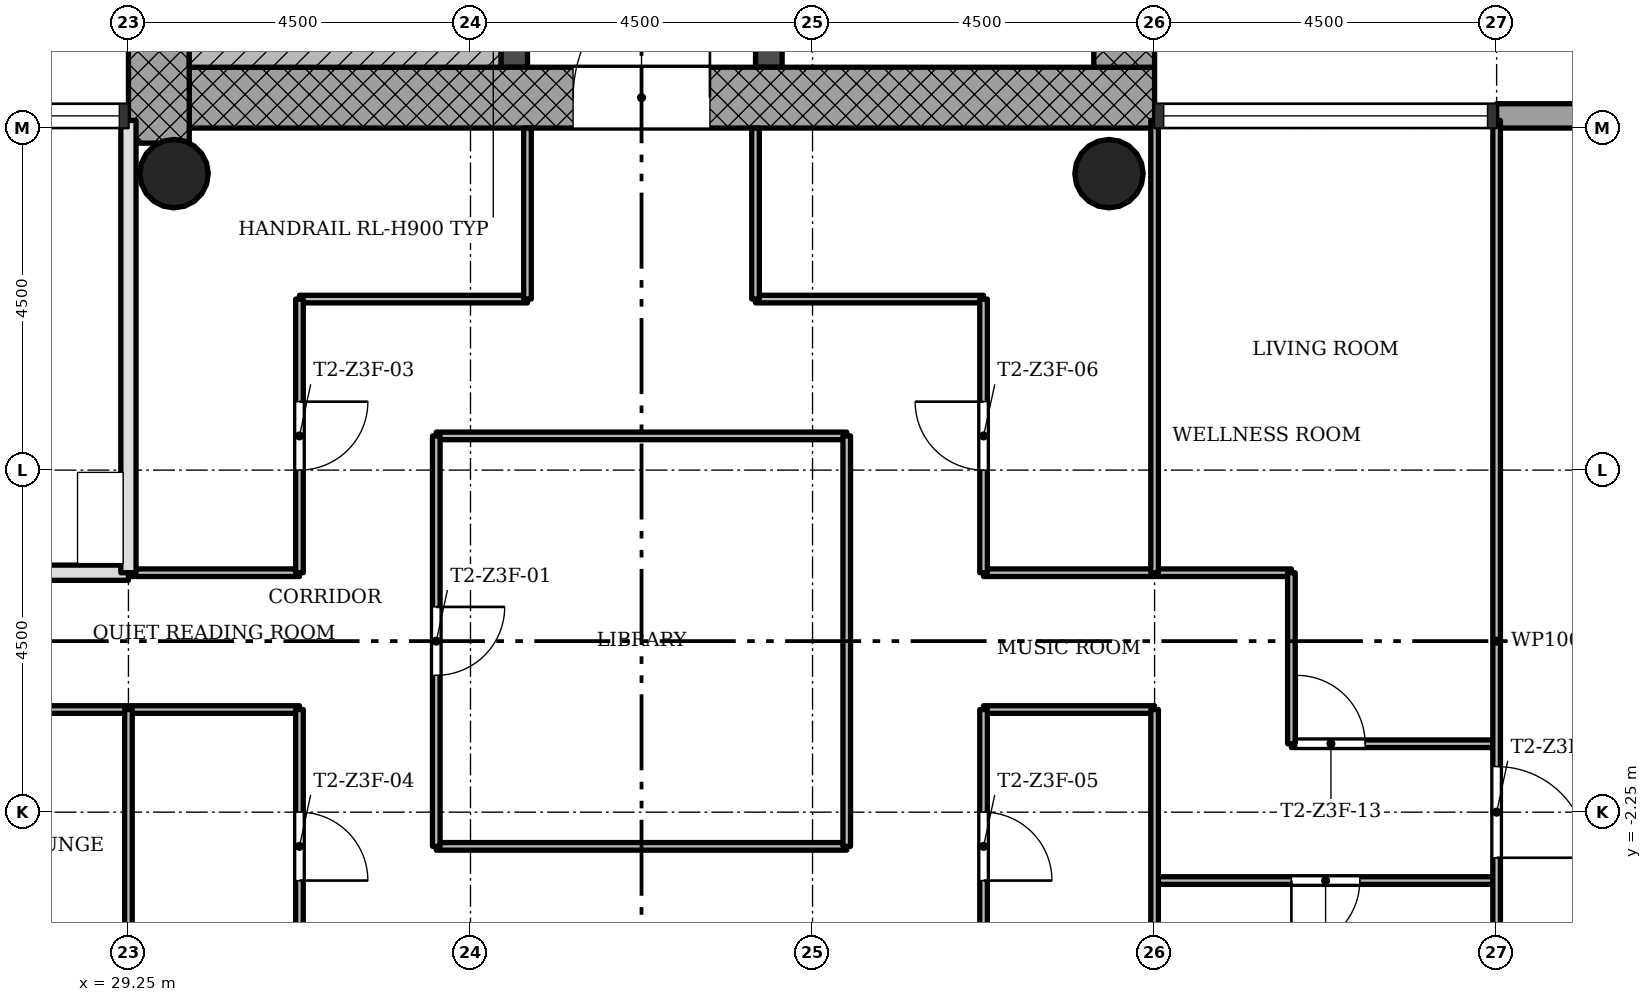
"""IFC4 building model, lengths in metres.
Left out: names, types, materials, properties, quantities, classifications, styles, units other than length and angle.
Written with IfcOpenShell. Run it as: python <this file> out.ifc"""

import sys

from ifc_helpers import new_model, si_unit, direction, frame, frame_2d, origin, origin_2d, place, context, subcontext, project, spatial, rectangle, hollow_circle, extrude, element, fill, save


model = new_model("IFC4")
c1 = context("Model", 3, precision=1e-05, world=origin(), true_north=direction((0.0, 1.0)))
c2 = subcontext(c1, "Body", "Model", "MODEL_VIEW")
j1 = project(units=[si_unit("LENGTHUNIT", "METRE"), si_unit("PLANEANGLEUNIT", "RADIAN")], contexts=[c1])
p1 = place(None, origin())
s1 = spatial("IfcSite", under=j1, at=p1, CompositionType="ELEMENT")
p2 = place(p1, origin())
s2 = spatial("IfcBuilding", under=s1, at=p2, CompositionType="ELEMENT")
p3 = place(p2, frame((0.0, 0.0, 171.1)))
s3 = spatial("IfcBuildingStorey", under=s2, at=p3, CompositionType="ELEMENT", Elevation=171.1)
p4 = place(p3, frame((30.05, 7.15, 0.0), z_axis=(0.0, 0.0, 1.0), x_axis=(1.0, 0.0, 0.0)))
e1 = element("IfcWall", 1, at=p4, inside=s3, PredefinedType="SHEAR", context=c2, shape_type="SweptSolid", body=[
    extrude(rectangle(XDim=12.7, YDim=0.8, at=frame_2d((6.35, 0.0))), origin(), (0.0, 0.0, 1.0), 3.4),
])
p5 = place(p4, frame((5.05, 0.0, 0.0)))
e2 = element("IfcOpeningElement", 2, at=p5, cuts=e1, PredefinedType="OPENING", context=c2, shape_type="SweptSolid", body=[
    extrude(rectangle(XDim=1.8, YDim=2.1, at=frame_2d((0.9, 1.05))), frame((0.0, 0.41, 0.0), z_axis=(0.0, -1.0, 0.0), x_axis=(1.0, 0.0, 0.0)), (0.0, 0.0, 1.0), 0.82),
])
p6 = place(p3, frame((42.35, 7.55, 0.0), z_axis=(0.0, 0.0, 1.0), x_axis=(0.0, 1.0, 0.0)))
e3 = element("IfcWall", 3, at=p6, inside=s3, PredefinedType="SHEAR", context=c2, shape_type="SweptSolid", body=[
    extrude(rectangle(XDim=8.2, YDim=0.8, at=frame_2d((4.1, 0.0))), origin(), (0.0, 0.0, 1.0), 3.4),
])
p7 = place(p3, frame((29.65, 15.348, 0.0), z_axis=(0.0, 0.0, 1.0), x_axis=(0.0, -1.0, 0.0)))
e4 = element("IfcWall", 4, at=p7, inside=s3, PredefinedType="SHEAR", context=c2, shape_type="SweptSolid", body=[
    extrude(rectangle(XDim=8.796, YDim=0.8, at=frame_2d((4.398, 0.0))), origin(), (0.0, 0.0, 1.0), 3.4),
])
p8 = place(p3, frame((34.325, 7.55, 0.0), z_axis=(0.0, 0.0, 1.0), x_axis=(0.0, 1.0, 0.0)))
e5 = element("IfcWall", 5, at=p8, inside=s3, PredefinedType="SHEAR", context=c2, shape_type="SweptSolid", body=[
    extrude(rectangle(XDim=7.4, YDim=0.35, at=frame_2d((3.7, 0.0))), origin(), (0.0, 0.0, 1.0), 3.4),
])
p9 = place(p8, frame((0.85, 0.0, 0.0)))
e6 = element("IfcOpeningElement", 6, at=p9, cuts=e5, PredefinedType="OPENING", context=c2, shape_type="SweptSolid", body=[
    extrude(rectangle(XDim=0.9, YDim=2.1, at=frame_2d((0.45, 1.05))), frame((0.0, 0.185, 0.0), z_axis=(0.0, -1.0, 0.0), x_axis=(1.0, 0.0, 0.0)), (0.0, 0.0, 1.0), 0.37),
])
p10 = place(p3, frame((37.675, 7.55, 0.0), z_axis=(0.0, 0.0, 1.0), x_axis=(0.0, 1.0, 0.0)))
e7 = element("IfcWall", 7, at=p10, inside=s3, PredefinedType="SHEAR", context=c2, shape_type="SweptSolid", body=[
    extrude(rectangle(XDim=7.4, YDim=0.35, at=frame_2d((3.7, 0.0))), origin(), (0.0, 0.0, 1.0), 3.4),
])
p11 = place(p10, frame((0.95, 0.0, 0.0)))
e8 = element("IfcOpeningElement", 8, at=p11, cuts=e7, PredefinedType="OPENING", context=c2, shape_type="SweptSolid", body=[
    extrude(rectangle(XDim=1.1, YDim=2.1, at=frame_2d((0.55, 1.05))), frame((0.0, 0.185, 0.0), z_axis=(0.0, -1.0, 0.0), x_axis=(1.0, 0.0, 0.0)), (0.0, 0.0, 1.0), 0.37),
])
p12 = place(p10, frame((3.15, 0.0, 0.0)))
e9 = element("IfcOpeningElement", 9, at=p12, cuts=e7, PredefinedType="OPENING", context=c2, shape_type="SweptSolid", body=[
    extrude(rectangle(XDim=1.1, YDim=2.1, at=frame_2d((0.55, 1.05))), frame((0.0, 0.185, 0.0), z_axis=(0.0, -1.0, 0.0), x_axis=(1.0, 0.0, 0.0)), (0.0, 0.0, 1.0), 0.37),
])
p13 = place(p10, frame((5.35, 0.0, 0.0)))
e10 = element("IfcOpeningElement", 10, at=p13, cuts=e7, PredefinedType="OPENING", context=c2, shape_type="SweptSolid", body=[
    extrude(rectangle(XDim=1.1, YDim=2.1, at=frame_2d((0.55, 1.05))), frame((0.0, 0.185, 0.0), z_axis=(0.0, -1.0, 0.0), x_axis=(1.0, 0.0, 0.0)), (0.0, 0.0, 1.0), 0.37),
])
for number, where, z_axis, x_axis in (
    (11, (42.15, 6.15, 0.0), (0.0, 0.0, 1.0), (1.0, 0.0, 0.0)),
    (12, (29.85, 6.15, 0.0), (0.0, 0.0, 1.0), (1.0, 0.0, 0.0)),
):
    element("IfcColumn", number, at=place(p3, frame(where, z_axis=z_axis, x_axis=x_axis)), inside=s3, PredefinedType="COLUMN", context=c2, shape_type="SweptSolid", body=[
        extrude(hollow_circle(Radius=0.45, WallThickness=0.032, at=origin_2d()), origin(), (0.0, 0.0, 1.0), 3.4),
    ])
p14 = place(p3, frame((48.75, 6.91, -0.3), z_axis=(0.0, 0.0, 1.0), x_axis=(-1.0, 0.0, 0.0)))
e13 = element("IfcWall", 13, at=p14, inside=s3, PredefinedType="STANDARD", context=c2, shape_type="SweptSolid", body=[
    extrude(rectangle(XDim=1.5, YDim=0.32, at=frame_2d((0.75, 0.0))), origin(), (0.0, 0.0, 1.0), 3.4),
])
p15 = place(p3, frame((47.25, -3.15, 0.0), z_axis=(0.0, 0.0, 1.0), x_axis=(-1.0, 0.0, 0.0)))
e14 = element("IfcWall", 14, at=p15, inside=s3, PredefinedType="PARTITIONING", context=c2, shape_type="SweptSolid", body=[
    extrude(rectangle(XDim=4.5, YDim=0.1, at=frame_2d((2.25, 0.0))), origin(), (0.0, 0.0, 1.0), 3.0),
])
p16 = place(p15, frame((1.8, 0.0, 0.0)))
e15 = element("IfcOpeningElement", 15, at=p16, cuts=e14, PredefinedType="OPENING", context=c2, shape_type="SweptSolid", body=[
    extrude(rectangle(XDim=0.9, YDim=2.1, at=frame_2d((0.45, 1.05))), frame((0.0, 0.06, 0.0), z_axis=(0.0, -1.0, 0.0), x_axis=(1.0, 0.0, 0.0)), (0.0, 0.0, 1.0), 0.12),
])
p17 = place(p3, frame((38.7, -2.7, 0.0), z_axis=(0.0, 0.0, 1.0), x_axis=(-1.0, 0.0, 0.0)))
e16 = element("IfcWall", 16, at=p17, inside=s3, PredefinedType="PARTITIONING", context=c2, shape_type="SweptSolid", body=[
    extrude(rectangle(XDim=5.4, YDim=0.1, at=frame_2d((2.7, 0.0))), origin(), (0.0, 0.0, 1.0), 3.0),
])
p18 = place(p3, frame((47.25, -1.35, 0.0), z_axis=(0.0, 0.0, 1.0), x_axis=(-1.0, 0.0, 0.0)))
e17 = element("IfcWall", 17, at=p18, inside=s3, PredefinedType="PARTITIONING", context=c2, shape_type="SweptSolid", body=[
    extrude(rectangle(XDim=2.7, YDim=0.1, at=frame_2d((1.35, 0.0))), origin(), (0.0, 0.0, 1.0), 3.0),
])
p19 = place(p18, frame((1.73, 0.0, 0.0)))
e18 = element("IfcOpeningElement", 18, at=p19, cuts=e17, PredefinedType="OPENING", context=c2, shape_type="SweptSolid", body=[
    extrude(rectangle(XDim=0.9, YDim=2.1, at=frame_2d((0.45, 1.05))), frame((0.0, 0.06, 0.0), z_axis=(0.0, -1.0, 0.0), x_axis=(1.0, 0.0, 0.0)), (0.0, 0.0, 1.0), 0.12),
])
p20 = place(p3, frame((42.75, -0.9, 0.0), z_axis=(0.0, 0.0, 1.0), x_axis=(-1.0, 0.0, 0.0)))
e19 = element("IfcWall", 19, at=p20, inside=s3, PredefinedType="PARTITIONING", context=c2, shape_type="SweptSolid", body=[
    extrude(rectangle(XDim=2.25, YDim=0.1, at=frame_2d((1.125, 0.0))), origin(), (0.0, 0.0, 1.0), 3.0),
])
p21 = place(p3, frame((31.5, -0.9, 0.0), z_axis=(0.0, 0.0, 1.0), x_axis=(-1.0, 0.0, 0.0)))
e20 = element("IfcWall", 20, at=p21, inside=s3, PredefinedType="PARTITIONING", context=c2, shape_type="SweptSolid", body=[
    extrude(rectangle(XDim=6.75, YDim=0.1, at=frame_2d((3.375, 0.0))), origin(), (0.0, 0.0, 1.0), 3.0),
])
p22 = place(p21, frame((4.05, 0.0, 0.0)))
e21 = element("IfcOpeningElement", 21, at=p22, cuts=e20, PredefinedType="OPENING", context=c2, shape_type="SweptSolid", body=[
    extrude(rectangle(XDim=0.9, YDim=2.1, at=frame_2d((0.45, 1.05))), frame((0.0, 0.06, 0.0), z_axis=(0.0, -1.0, 0.0), x_axis=(1.0, 0.0, 0.0)), (0.0, 0.0, 1.0), 0.12),
])
p23 = place(p3, frame((44.55, 0.9, 0.0), z_axis=(0.0, 0.0, 1.0), x_axis=(-1.0, 0.0, 0.0)))
e22 = element("IfcWall", 22, at=p23, inside=s3, PredefinedType="PARTITIONING", context=c2, shape_type="SweptSolid", body=[
    extrude(rectangle(XDim=4.05, YDim=0.1, at=frame_2d((2.025, 0.0))), origin(), (0.0, 0.0, 1.0), 3.0),
])
p24 = place(p3, frame((31.5, 0.9, 0.0), z_axis=(0.0, 0.0, 1.0), x_axis=(-1.0, 0.0, 0.0)))
e23 = element("IfcWall", 23, at=p24, inside=s3, PredefinedType="PARTITIONING", context=c2, shape_type="SweptSolid", body=[
    extrude(rectangle(XDim=2.25, YDim=0.1, at=frame_2d((1.125, 0.0))), origin(), (0.0, 0.0, 1.0), 3.0),
])
p25 = place(p3, frame((29.25, 0.9, 0.0), z_axis=(0.0, 0.0, 1.0), x_axis=(-1.0, 0.0, 0.0)))
e24 = element("IfcWall", 24, at=p25, inside=s3, PredefinedType="SOLIDWALL", context=c2, shape_type="SweptSolid", body=[
    extrude(rectangle(XDim=9.0, YDim=0.2, at=frame_2d((4.5, 0.0))), origin(), (0.0, 0.0, 1.0), 3.0),
])
p26 = place(p25, frame((6.15, 0.0, 0.0)))
e25 = element("IfcOpeningElement", 25, at=p26, cuts=e24, PredefinedType="OPENING", context=c2, shape_type="SweptSolid", body=[
    extrude(rectangle(XDim=0.9, YDim=2.1, at=frame_2d((0.45, 1.05))), frame((0.0, 0.11, 0.0), z_axis=(0.0, -1.0, 0.0), x_axis=(1.0, 0.0, 0.0)), (0.0, 0.0, 1.0), 0.22),
])
p27 = place(p3, frame((38.7, 2.7, 0.0), z_axis=(0.0, 0.0, 1.0), x_axis=(-1.0, 0.0, 0.0)))
e26 = element("IfcWall", 26, at=p27, inside=s3, PredefinedType="PARTITIONING", context=c2, shape_type="SweptSolid", body=[
    extrude(rectangle(XDim=5.4, YDim=0.1, at=frame_2d((2.7, 0.0))), origin(), (0.0, 0.0, 1.0), 3.0),
])
for number, where, z_axis, x_axis in (
    (27, (40.5, 4.5, 0.0), (0.0, 0.0, 1.0), (-1.0, 0.0, 0.0)),
    (28, (34.5, 4.5, 0.0), (0.0, 0.0, 1.0), (-1.0, 0.0, 0.0)),
):
    element("IfcWall", number, at=place(p3, frame(where, z_axis=z_axis, x_axis=x_axis)), inside=s3, PredefinedType="PARTITIONING", context=c2, shape_type="SweptSolid", body=[
        extrude(rectangle(XDim=3.0, YDim=0.1, at=frame_2d((1.5, 0.0))), origin(), (0.0, 0.0, 1.0), 3.0),
    ])
p28 = place(p3, frame((47.25, -6.85, 0.0), z_axis=(0.0, 0.0, 1.0), x_axis=(0.0, 1.0, 0.0)))
e29 = element("IfcWall", 29, at=p28, inside=s3, PredefinedType="PARTITIONING", context=c2, shape_type="SweptSolid", body=[
    extrude(rectangle(XDim=13.7, YDim=0.1, at=frame_2d((6.85, 0.0))), origin(), (0.0, 0.0, 1.0), 3.0),
])
p29 = place(p28, frame((4.0, 0.0, 0.0)))
e30 = element("IfcOpeningElement", 30, at=p29, cuts=e29, PredefinedType="OPENING", context=c2, shape_type="SweptSolid", body=[
    extrude(rectangle(XDim=1.2, YDim=2.1, at=frame_2d((0.6, 1.05))), frame((0.0, 0.06, 0.0), z_axis=(0.0, -1.0, 0.0), x_axis=(1.0, 0.0, 0.0)), (0.0, 0.0, 1.0), 0.12),
])
p30 = place(p3, frame((44.55, -1.35, 0.0), z_axis=(0.0, 0.0, 1.0), x_axis=(0.0, 1.0, 0.0)))
e31 = element("IfcWall", 31, at=p30, inside=s3, PredefinedType="PARTITIONING", context=c2, shape_type="SweptSolid", body=[
    extrude(rectangle(XDim=2.25, YDim=0.1, at=frame_2d((1.125, 0.0))), origin(), (0.0, 0.0, 1.0), 3.0),
])
for number, where, z_axis, x_axis in (
    (32, (42.75, -6.85, 0.0), (0.0, 0.0, 1.0), (0.0, 1.0, 0.0)),
    (33, (42.75, 0.9, 0.0), (0.0, 0.0, 1.0), (0.0, 1.0, 0.0)),
):
    element("IfcWall", number, at=place(p3, frame(where, z_axis=z_axis, x_axis=x_axis)), inside=s3, PredefinedType="PARTITIONING", context=c2, shape_type="SweptSolid", body=[
        extrude(rectangle(XDim=5.95, YDim=0.1, at=frame_2d((2.975, 0.0))), origin(), (0.0, 0.0, 1.0), 3.0),
    ])
p31 = place(p3, frame((40.5, -4.5, 0.0), z_axis=(0.0, 0.0, 1.0), x_axis=(0.0, 1.0, 0.0)))
e34 = element("IfcWall", 34, at=p31, inside=s3, PredefinedType="PARTITIONING", context=c2, shape_type="SweptSolid", body=[
    extrude(rectangle(XDim=3.6, YDim=0.1, at=frame_2d((1.8, 0.0))), origin(), (0.0, 0.0, 1.0), 3.0),
])
p32 = place(p31, frame((1.35, 0.0, 0.0)))
e35 = element("IfcOpeningElement", 35, at=p32, cuts=e34, PredefinedType="OPENING", context=c2, shape_type="SweptSolid", body=[
    extrude(rectangle(XDim=0.9, YDim=2.1, at=frame_2d((0.45, 1.05))), frame((0.0, 0.06, 0.0), z_axis=(0.0, -1.0, 0.0), x_axis=(1.0, 0.0, 0.0)), (0.0, 0.0, 1.0), 0.12),
])
p33 = place(p3, frame((40.5, 0.9, 0.0), z_axis=(0.0, 0.0, 1.0), x_axis=(0.0, 1.0, 0.0)))
e36 = element("IfcWall", 36, at=p33, inside=s3, PredefinedType="PARTITIONING", context=c2, shape_type="SweptSolid", body=[
    extrude(rectangle(XDim=3.6, YDim=0.1, at=frame_2d((1.8, 0.0))), origin(), (0.0, 0.0, 1.0), 3.0),
])
p34 = place(p33, frame((1.35, 0.0, 0.0)))
e37 = element("IfcOpeningElement", 37, at=p34, cuts=e36, PredefinedType="OPENING", context=c2, shape_type="SweptSolid", body=[
    extrude(rectangle(XDim=0.9, YDim=2.1, at=frame_2d((0.45, 1.05))), frame((0.0, 0.06, 0.0), z_axis=(0.0, -1.0, 0.0), x_axis=(1.0, 0.0, 0.0)), (0.0, 0.0, 1.0), 0.12),
])
p35 = place(p3, frame((38.7, -2.7, 0.0), z_axis=(0.0, 0.0, 1.0), x_axis=(0.0, 1.0, 0.0)))
e38 = element("IfcWall", 38, at=p35, inside=s3, PredefinedType="PARTITIONING", context=c2, shape_type="SweptSolid", body=[
    extrude(rectangle(XDim=5.4, YDim=0.1, at=frame_2d((2.7, 0.0))), origin(), (0.0, 0.0, 1.0), 3.0),
])
for number, where, z_axis, x_axis in (
    (39, (37.5, 4.5, 0.0), (0.0, 0.0, 1.0), (0.0, 1.0, 0.0)),
    (40, (34.5, 4.5, 0.0), (0.0, 0.0, 1.0), (0.0, 1.0, 0.0)),
):
    element("IfcWall", number, at=place(p3, frame(where, z_axis=z_axis, x_axis=x_axis)), inside=s3, PredefinedType="PARTITIONING", context=c2, shape_type="SweptSolid", body=[
        extrude(rectangle(XDim=2.25, YDim=0.1, at=frame_2d((1.125, 0.0))), origin(), (0.0, 0.0, 1.0), 3.0),
    ])
p36 = place(p3, frame((33.3, -2.7, 0.0), z_axis=(0.0, 0.0, 1.0), x_axis=(0.0, 1.0, 0.0)))
e41 = element("IfcWall", 41, at=p36, inside=s3, PredefinedType="PARTITIONING", context=c2, shape_type="SweptSolid", body=[
    extrude(rectangle(XDim=5.4, YDim=0.1, at=frame_2d((2.7, 0.0))), origin(), (0.0, 0.0, 1.0), 3.0),
])
p37 = place(p36, frame((2.25, 0.0, 0.0)))
e42 = element("IfcOpeningElement", 42, at=p37, cuts=e41, PredefinedType="OPENING", context=c2, shape_type="SweptSolid", body=[
    extrude(rectangle(XDim=0.9, YDim=2.1, at=frame_2d((0.45, 1.05))), frame((0.0, 0.06, 0.0), z_axis=(0.0, -1.0, 0.0), x_axis=(1.0, 0.0, 0.0)), (0.0, 0.0, 1.0), 0.12),
])
p38 = place(p3, frame((31.5, -4.5, 0.0), z_axis=(0.0, 0.0, 1.0), x_axis=(0.0, 1.0, 0.0)))
e43 = element("IfcWall", 43, at=p38, inside=s3, PredefinedType="PARTITIONING", context=c2, shape_type="SweptSolid", body=[
    extrude(rectangle(XDim=3.6, YDim=0.1, at=frame_2d((1.8, 0.0))), origin(), (0.0, 0.0, 1.0), 3.0),
])
p39 = place(p38, frame((1.35, 0.0, 0.0)))
e44 = element("IfcOpeningElement", 44, at=p39, cuts=e43, PredefinedType="OPENING", context=c2, shape_type="SweptSolid", body=[
    extrude(rectangle(XDim=0.9, YDim=2.1, at=frame_2d((0.45, 1.05))), frame((0.0, 0.06, 0.0), z_axis=(0.0, -1.0, 0.0), x_axis=(1.0, 0.0, 0.0)), (0.0, 0.0, 1.0), 0.12),
])
p40 = place(p3, frame((31.5, 0.9, 0.0), z_axis=(0.0, 0.0, 1.0), x_axis=(0.0, 1.0, 0.0)))
e45 = element("IfcWall", 45, at=p40, inside=s3, PredefinedType="PARTITIONING", context=c2, shape_type="SweptSolid", body=[
    extrude(rectangle(XDim=3.6, YDim=0.1, at=frame_2d((1.8, 0.0))), origin(), (0.0, 0.0, 1.0), 3.0),
])
p41 = place(p40, frame((1.35, 0.0, 0.0)))
e46 = element("IfcOpeningElement", 46, at=p41, cuts=e45, PredefinedType="OPENING", context=c2, shape_type="SweptSolid", body=[
    extrude(rectangle(XDim=0.9, YDim=2.1, at=frame_2d((0.45, 1.05))), frame((0.0, 0.06, 0.0), z_axis=(0.0, -1.0, 0.0), x_axis=(1.0, 0.0, 0.0)), (0.0, 0.0, 1.0), 0.12),
])
p42 = place(p3, frame((29.25, -6.85, 0.0), z_axis=(0.0, 0.0, 1.0), x_axis=(0.0, 1.0, 0.0)))
e47 = element("IfcWall", 47, at=p42, inside=s3, PredefinedType="PARTITIONING", context=c2, shape_type="SweptSolid", body=[
    extrude(rectangle(XDim=5.95, YDim=0.1, at=frame_2d((2.975, 0.0))), origin(), (0.0, 0.0, 1.0), 3.0),
])
p43 = place(p3, frame((29.25, 0.9, 0.0), z_axis=(0.0, 0.0, 1.0), x_axis=(0.0, 1.0, 0.0)))
e48 = element("IfcWall", 48, at=p43, inside=s3, PredefinedType="SOLIDWALL", context=c2, shape_type="SweptSolid", body=[
    extrude(rectangle(XDim=5.95, YDim=0.2, at=frame_2d((2.975, 0.0))), origin(), (0.0, 0.0, 1.0), 3.0),
])
p44 = place(p3, frame((34.15, 7.75, 0.0), z_axis=(0.0, 0.0, 1.0), x_axis=(-1.0, 0.0, 0.0)))
e49 = element("IfcWall", 49, at=p44, inside=s3, PredefinedType="SHEAR", context=c2, shape_type="SweptSolid", body=[
    extrude(rectangle(XDim=4.1, YDim=0.4, at=frame_2d((2.05, 0.0))), origin(), (0.0, 0.0, 1.0), 3.4),
])
p45 = place(p37, origin())
e50 = element("IfcDoor", 50, at=p45, inside=s3, OperationType="SINGLE_SWING_RIGHT", PredefinedType="DOOR", context=c2, shape_type="SweptSolid", body=[
    extrude(rectangle(XDim=0.9, YDim=2.1, at=frame_2d((0.45, 1.05))), frame((0.0, 0.025, 0.0), z_axis=(0.0, -1.0, 0.0), x_axis=(1.0, 0.0, 0.0)), (0.0, 0.0, 1.0), 0.05),
])
fill(e42, e50)
p46 = place(p41, origin())
e51 = element("IfcDoor", 51, at=p46, inside=s3, OperationType="SINGLE_SWING_RIGHT", PredefinedType="DOOR", context=c2, shape_type="SweptSolid", body=[
    extrude(rectangle(XDim=0.9, YDim=2.1, at=frame_2d((0.45, 1.05))), frame((0.0, 0.025, 0.0), z_axis=(0.0, -1.0, 0.0), x_axis=(1.0, 0.0, 0.0)), (0.0, 0.0, 1.0), 0.05),
])
fill(e46, e51)
p47 = place(p39, origin())
e52 = element("IfcDoor", 52, at=p47, inside=s3, OperationType="SINGLE_SWING_LEFT", PredefinedType="DOOR", context=c2, shape_type="SweptSolid", body=[
    extrude(rectangle(XDim=0.9, YDim=2.1, at=frame_2d((0.45, 1.05))), frame((0.0, 0.025, 0.0), z_axis=(0.0, -1.0, 0.0), x_axis=(1.0, 0.0, 0.0)), (0.0, 0.0, 1.0), 0.05),
])
fill(e44, e52)
p48 = place(p32, origin())
e53 = element("IfcDoor", 53, at=p48, inside=s3, OperationType="SINGLE_SWING_LEFT", PredefinedType="DOOR", context=c2, shape_type="SweptSolid", body=[
    extrude(rectangle(XDim=0.9, YDim=2.1, at=frame_2d((0.45, 1.05))), frame((0.0, 0.025, 0.0), z_axis=(0.0, -1.0, 0.0), x_axis=(1.0, 0.0, 0.0)), (0.0, 0.0, 1.0), 0.05),
])
fill(e35, e53)
p49 = place(p34, origin())
e54 = element("IfcDoor", 54, at=p49, inside=s3, OperationType="SINGLE_SWING_LEFT", PredefinedType="DOOR", context=c2, shape_type="SweptSolid", body=[
    extrude(rectangle(XDim=0.9, YDim=2.1, at=frame_2d((0.45, 1.05))), frame((0.0, 0.025, 0.0), z_axis=(0.0, -1.0, 0.0), x_axis=(1.0, 0.0, 0.0)), (0.0, 0.0, 1.0), 0.05),
])
fill(e37, e54)
p50 = place(p19, origin())
e55 = element("IfcDoor", 55, at=p50, inside=s3, OperationType="SINGLE_SWING_RIGHT", PredefinedType="DOOR", context=c2, shape_type="SweptSolid", body=[
    extrude(rectangle(XDim=0.9, YDim=2.1, at=frame_2d((0.45, 1.05))), frame((0.0, 0.025, 0.0), z_axis=(0.0, -1.0, 0.0), x_axis=(1.0, 0.0, 0.0)), (0.0, 0.0, 1.0), 0.05),
])
fill(e18, e55)
p51 = place(p16, origin())
e56 = element("IfcDoor", 56, at=p51, inside=s3, OperationType="SINGLE_SWING_LEFT", PredefinedType="DOOR", context=c2, shape_type="SweptSolid", body=[
    extrude(rectangle(XDim=0.9, YDim=2.1, at=frame_2d((0.45, 1.05))), frame((0.0, 0.025, 0.0), z_axis=(0.0, -1.0, 0.0), x_axis=(1.0, 0.0, 0.0)), (0.0, 0.0, 1.0), 0.05),
])
fill(e15, e56)
p52 = place(p29, origin())
e57 = element("IfcDoor", 57, at=p52, inside=s3, OperationType="SINGLE_SWING_LEFT", PredefinedType="DOOR", context=c2, shape_type="SweptSolid", body=[
    extrude(rectangle(XDim=1.2, YDim=2.1, at=frame_2d((0.6, 1.05))), frame((0.0, 0.025, 0.0), z_axis=(0.0, -1.0, 0.0), x_axis=(1.0, 0.0, 0.0)), (0.0, 0.0, 1.0), 0.05),
])
fill(e30, e57)
p53 = place(p5, origin())
e58 = element("IfcDoor", 58, at=p53, inside=s3, OperationType="SINGLE_SWING_LEFT", PredefinedType="DOOR", context=c2, shape_type="SweptSolid", body=[
    extrude(rectangle(XDim=1.8, YDim=2.1, at=frame_2d((0.9, 1.05))), frame((0.0, 0.025, 0.0), z_axis=(0.0, -1.0, 0.0), x_axis=(1.0, 0.0, 0.0)), (0.0, 0.0, 1.0), 0.05),
])
fill(e2, e58)
save(model, sys.argv[1])
